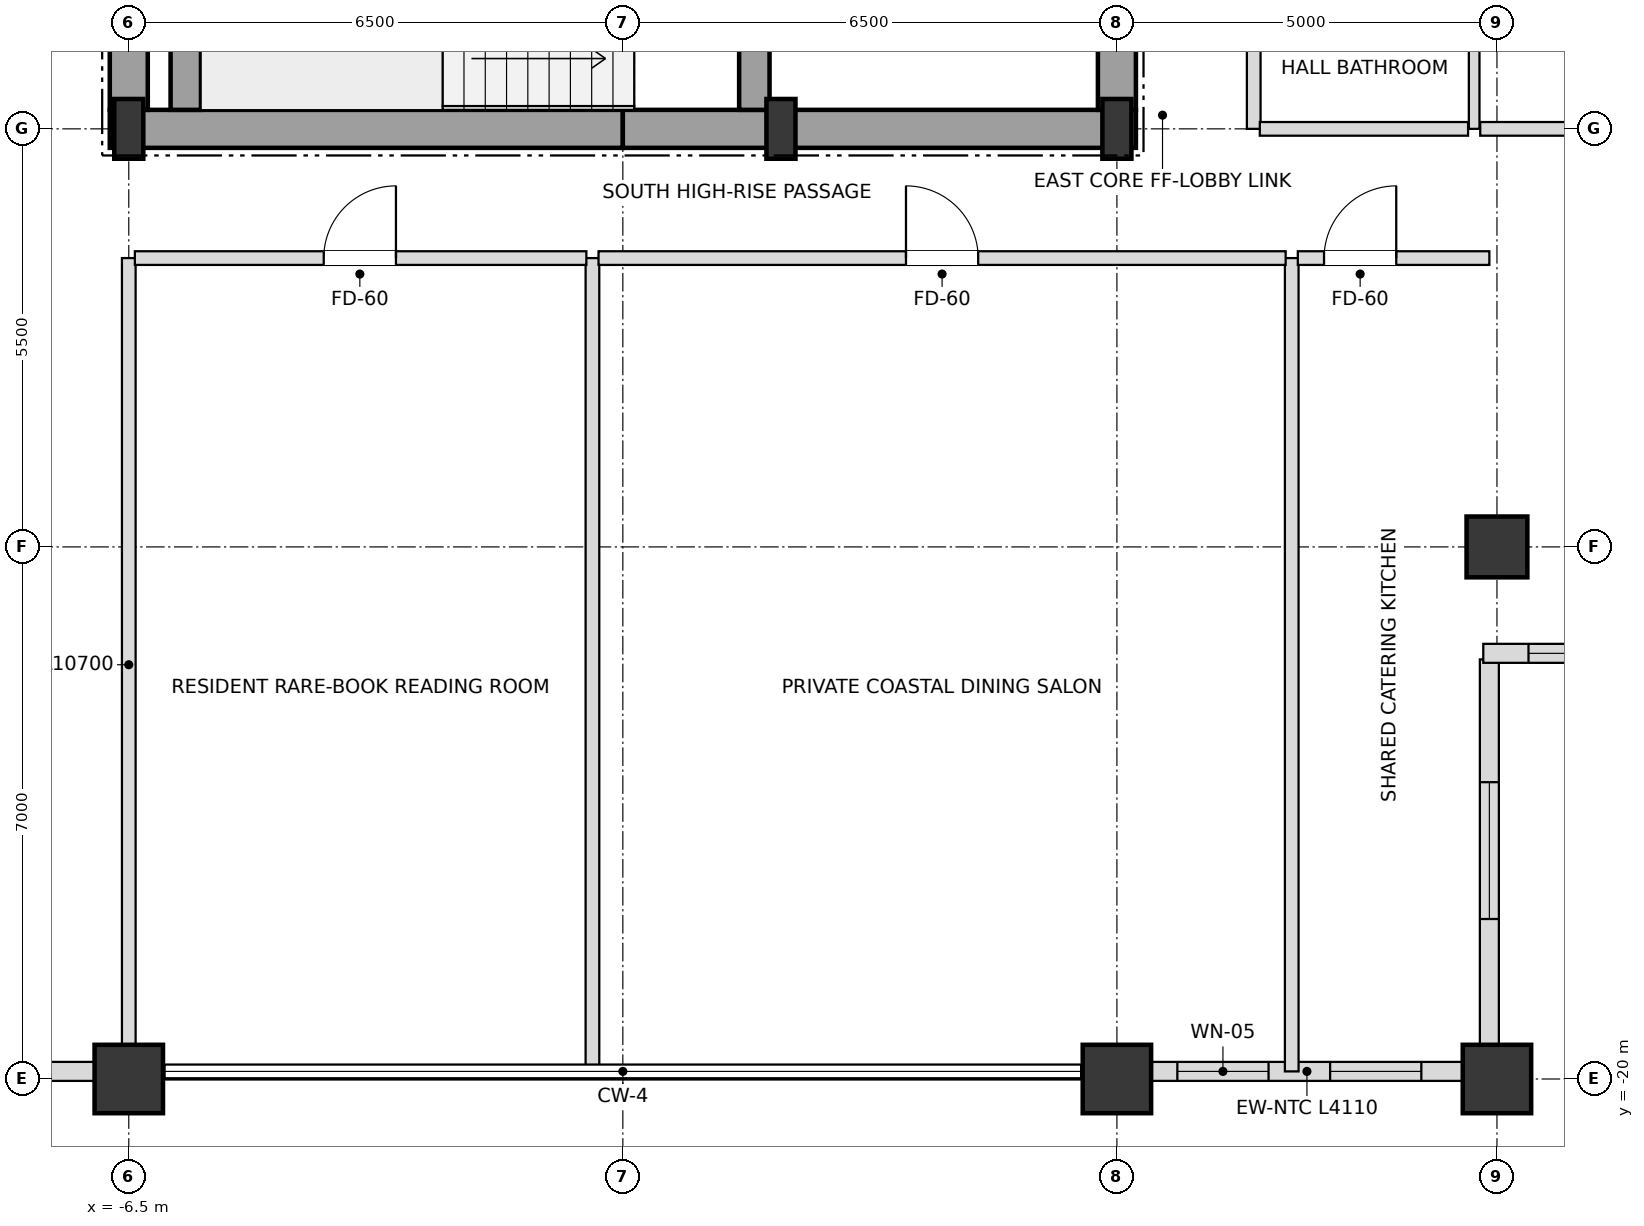
"""IFC4 building model, lengths in metres.
Left out: names, types, materials, properties, quantities, classifications, styles, units other than length and angle.
Written with IfcOpenShell. Run it as: python <this file> out.ifc"""

import sys

from ifc_helpers import new_model, si_unit, direction, frame, frame_2d, origin, origin_2d, place, context, subcontext, project, spatial, rectangle, i_section, extrude, element, fill, save


model = new_model("IFC4")
c1 = context("Model", 3, precision=1e-05, world=origin(), true_north=direction((0.0, 1.0)))
c2 = subcontext(c1, "Body", "Model", "MODEL_VIEW")
j1 = project(units=[si_unit("LENGTHUNIT", "METRE"), si_unit("PLANEANGLEUNIT", "RADIAN")], contexts=[c1])
p1 = place(None, origin())
s1 = spatial("IfcSite", under=j1, at=p1, CompositionType="ELEMENT")
p2 = place(p1, origin())
s2 = spatial("IfcBuilding", under=s1, at=p2, CompositionType="ELEMENT")
p3 = place(p2, frame((0.0, 0.0, 276.3)))
s3 = spatial("IfcBuildingStorey", under=s2, at=p3, CompositionType="ELEMENT", Elevation=276.3)
for number, where, z_axis, x_axis in (
    (1, (-6.5, -7.5, 0.0), (0.0, 0.0, 1.0), (1.0, 0.0, 0.0)),
    (2, (2.08, -7.5, 0.0), (0.0, 0.0, 1.0), (1.0, 0.0, 0.0)),
    (3, (6.5, -7.5, 0.0), (0.0, 0.0, 1.0), (1.0, 0.0, 0.0)),
):
    element("IfcColumn", number, at=place(p3, frame(where, z_axis=z_axis, x_axis=x_axis)), inside=s3, PredefinedType="COLUMN", context=c2, shape_type="SweptSolid", body=[
        extrude(i_section(OverallWidth=0.382, OverallDepth=0.786, WebThickness=0.02, FlangeThickness=0.033, at=origin_2d()), origin(), (0.0, 0.0, 1.0), 3.6),
    ])
for number, where, z_axis, x_axis in (
    (4, (-6.5, -20.0, 0.0), (0.0, 0.0, 1.0), (1.0, 0.0, 0.0)),
    (5, (6.5, -20.0, 0.0), (0.0, 0.0, 1.0), (1.0, 0.0, 0.0)),
    (6, (11.5, -20.0, 0.0), (0.0, 0.0, 1.0), (1.0, 0.0, 0.0)),
):
    element("IfcColumn", number, at=place(p3, frame(where, z_axis=z_axis, x_axis=x_axis)), inside=s3, PredefinedType="USERDEFINED", context=c2, shape_type="SweptSolid", body=[
        extrude(rectangle(XDim=0.9, YDim=0.9, at=origin_2d()), origin(), (0.0, 0.0, 1.0), 3.6),
    ])
p4 = place(p3, frame((11.5, -13.0, 0.0), z_axis=(0.0, 0.0, 1.0), x_axis=(1.0, 0.0, 0.0)))
e7 = element("IfcColumn", 7, at=p4, inside=s3, PredefinedType="COLUMN", context=c2, shape_type="SweptSolid", body=[
    extrude(rectangle(XDim=0.8, YDim=0.8, at=origin_2d()), origin(), (0.0, 0.0, 1.0), 3.6),
])
p5 = place(p3, frame((-11.055, -19.9, 0.0), z_axis=(0.0, 0.0, 1.0), x_axis=(1.0, 0.0, 0.0)))
e8 = element("IfcWall", 8, at=p5, inside=s3, PredefinedType="SOLIDWALL", context=c2, shape_type="SweptSolid", body=[
    extrude(rectangle(XDim=4.11, YDim=0.25, at=frame_2d((2.055, 0.0))), origin(), (0.0, 0.0, 1.0), 2.748),
])
p6 = place(p5, frame((1.155, 0.0, 0.72)))
e9 = element("IfcOpeningElement", 9, at=p6, cuts=e8, PredefinedType="OPENING", context=c2, shape_type="SweptSolid", body=[
    extrude(rectangle(XDim=1.8, YDim=1.68, at=frame_2d((0.9, 0.84))), frame((0.0, 0.135, 0.0), z_axis=(0.0, -1.0, 0.0), x_axis=(1.0, 0.0, 0.0)), (0.0, 0.0, 1.0), 0.27),
])
p7 = place(p3, frame((6.945, -19.9, 0.0), z_axis=(0.0, 0.0, 1.0), x_axis=(1.0, 0.0, 0.0)))
e10 = element("IfcWall", 10, at=p7, inside=s3, PredefinedType="SOLIDWALL", context=c2, shape_type="SweptSolid", body=[
    extrude(rectangle(XDim=4.11, YDim=0.25, at=frame_2d((2.055, 0.0))), origin(), (0.0, 0.0, 1.0), 2.748),
])
p8 = place(p7, frame((0.35, 0.0, 0.72)))
e11 = element("IfcOpeningElement", 11, at=p8, cuts=e10, PredefinedType="OPENING", context=c2, shape_type="SweptSolid", body=[
    extrude(rectangle(XDim=1.2, YDim=1.68, at=frame_2d((0.6, 0.84))), frame((0.0, 0.135, 0.0), z_axis=(0.0, -1.0, 0.0), x_axis=(1.0, 0.0, 0.0)), (0.0, 0.0, 1.0), 0.27),
])
p9 = place(p7, frame((2.36, 0.0, 0.72)))
e12 = element("IfcOpeningElement", 12, at=p9, cuts=e10, PredefinedType="OPENING", context=c2, shape_type="SweptSolid", body=[
    extrude(rectangle(XDim=1.2, YDim=1.68, at=frame_2d((0.6, 0.84))), frame((0.0, 0.135, 0.0), z_axis=(0.0, -1.0, 0.0), x_axis=(1.0, 0.0, 0.0)), (0.0, 0.0, 1.0), 0.27),
])
p10 = place(p3, frame((11.4, -19.82, 0.0), z_axis=(0.0, 0.0, 1.0), x_axis=(0.0, 1.0, 0.0)))
e13 = element("IfcWall", 13, at=p10, inside=s3, PredefinedType="SOLIDWALL", context=c2, shape_type="SweptSolid", body=[
    extrude(rectangle(XDim=5.34, YDim=0.25, at=frame_2d((2.67, 0.0))), origin(), (0.0, 0.0, 1.0), 2.748),
])
p11 = place(p10, frame((1.925, 0.0, 0.72)))
e14 = element("IfcOpeningElement", 14, at=p11, cuts=e13, PredefinedType="OPENING", context=c2, shape_type="SweptSolid", body=[
    extrude(rectangle(XDim=1.8, YDim=1.68, at=frame_2d((0.9, 0.84))), frame((0.0, 0.135, 0.0), z_axis=(0.0, -1.0, 0.0), x_axis=(1.0, 0.0, 0.0)), (0.0, 0.0, 1.0), 0.27),
])
p12 = place(p3, frame((11.32, -14.4, 0.0), z_axis=(0.0, 0.0, 1.0), x_axis=(1.0, 0.0, 0.0)))
e15 = element("IfcWall", 15, at=p12, inside=s3, PredefinedType="SOLIDWALL", context=c2, shape_type="SweptSolid", body=[
    extrude(rectangle(XDim=5.66, YDim=0.25, at=frame_2d((2.83, 0.0))), origin(), (0.0, 0.0, 1.0), 2.748),
])
p13 = place(p12, frame((0.595, 0.0, 0.72)))
e16 = element("IfcOpeningElement", 16, at=p13, cuts=e15, PredefinedType="OPENING", context=c2, shape_type="SweptSolid", body=[
    extrude(rectangle(XDim=1.8, YDim=1.68, at=frame_2d((0.9, 0.84))), frame((0.0, 0.135, 0.0), z_axis=(0.0, -1.0, 0.0), x_axis=(1.0, 0.0, 0.0)), (0.0, 0.0, 1.0), 0.27),
])
p14 = place(p12, frame((3.265, 0.0, 0.72)))
e17 = element("IfcOpeningElement", 17, at=p14, cuts=e15, PredefinedType="OPENING", context=c2, shape_type="SweptSolid", body=[
    extrude(rectangle(XDim=1.8, YDim=1.68, at=frame_2d((0.9, 0.84))), frame((0.0, 0.135, 0.0), z_axis=(0.0, -1.0, 0.0), x_axis=(1.0, 0.0, 0.0)), (0.0, 0.0, 1.0), 0.27),
])
for number, where, z_axis, x_axis in (
    (18, (-6.75, -7.5, 0.0), (0.0, 0.0, 1.0), (1.0, 0.0, 0.0)),
    (19, (0.0, -7.5, 0.0), (0.0, 0.0, 1.0), (1.0, 0.0, 0.0)),
):
    element("IfcWall", number, at=place(p3, frame(where, z_axis=z_axis, x_axis=x_axis)), inside=s3, PredefinedType="SHEAR", context=c2, shape_type="SweptSolid", body=[
        extrude(rectangle(XDim=6.75, YDim=0.5, at=frame_2d((3.375, 0.0))), origin(), (0.0, 0.0, 1.0), 3.38),
    ])
p15 = place(p3, frame((-6.5, -7.25, 0.0), z_axis=(0.0, 0.0, 1.0), x_axis=(0.0, 1.0, 0.0)))
e20 = element("IfcWall", 20, at=p15, inside=s3, PredefinedType="SHEAR", context=c2, shape_type="SweptSolid", body=[
    extrude(rectangle(XDim=3.55, YDim=0.5, at=frame_2d((1.775, 0.0))), origin(), (0.0, 0.0, 1.0), 3.38),
])
p16 = place(p3, frame((6.5, -7.25, 0.0), z_axis=(0.0, 0.0, 1.0), x_axis=(0.0, 1.0, 0.0)))
e21 = element("IfcWall", 21, at=p16, inside=s3, PredefinedType="SHEAR", context=c2, shape_type="SweptSolid", body=[
    extrude(rectangle(XDim=5.75, YDim=0.5, at=frame_2d((2.875, 0.0))), origin(), (0.0, 0.0, 1.0), 3.38),
])
p17 = place(p16, frame((0.85, 0.0, 0.0)))
e22 = element("IfcOpeningElement", 22, at=p17, cuts=e21, PredefinedType="OPENING", context=c2, shape_type="SweptSolid", body=[
    extrude(rectangle(XDim=1.05, YDim=2.15, at=frame_2d((0.525, 1.075))), frame((0.0, 0.26, 0.0), z_axis=(0.0, -1.0, 0.0), x_axis=(1.0, 0.0, 0.0)), (0.0, 0.0, 1.0), 0.52),
])
p18 = place(p3, frame((-5.75, -7.25, 0.0), z_axis=(0.0, 0.0, 1.0), x_axis=(0.0, 1.0, 0.0)))
e23 = element("IfcWall", 23, at=p18, inside=s3, PredefinedType="SHEAR", context=c2, shape_type="SweptSolid", body=[
    extrude(rectangle(XDim=2.9, YDim=0.4, at=frame_2d((1.45, 0.0))), origin(), (0.0, 0.0, 1.0), 3.38),
])
p19 = place(p3, frame((1.73, -7.25, 0.0), z_axis=(0.0, 0.0, 1.0), x_axis=(0.0, 1.0, 0.0)))
e24 = element("IfcWall", 24, at=p19, inside=s3, PredefinedType="SHEAR", context=c2, shape_type="SweptSolid", body=[
    extrude(rectangle(XDim=3.3, YDim=0.4, at=frame_2d((1.65, 0.0))), origin(), (0.0, 0.0, 1.0), 3.38),
])
p20 = place(p19, frame((0.9, 0.0, 0.0)))
e25 = element("IfcOpeningElement", 25, at=p20, cuts=e24, PredefinedType="OPENING", context=c2, shape_type="SweptSolid", body=[
    extrude(rectangle(XDim=1.05, YDim=2.15, at=frame_2d((0.525, 1.075))), frame((0.0, 0.21, 0.0), z_axis=(0.0, -1.0, 0.0), x_axis=(1.0, 0.0, 0.0)), (0.0, 0.0, 1.0), 0.42),
])
p21 = place(p3, frame((-6.5, -19.9, 0.0), z_axis=(0.0, 0.0, 1.0), x_axis=(0.0, 1.0, 0.0)))
e26 = element("IfcWall", 26, at=p21, inside=s3, PredefinedType="PARTITIONING", context=c2, shape_type="SweptSolid", body=[
    extrude(rectangle(XDim=10.7, YDim=0.18, at=frame_2d((5.35, 0.0))), origin(), (0.0, 0.0, 1.0), 2.826),
])
p22 = place(p3, frame((-0.4, -19.9, 0.0), z_axis=(0.0, 0.0, 1.0), x_axis=(0.0, 1.0, 0.0)))
e27 = element("IfcWall", 27, at=p22, inside=s3, PredefinedType="PARTITIONING", context=c2, shape_type="SweptSolid", body=[
    extrude(rectangle(XDim=10.7, YDim=0.18, at=frame_2d((5.35, 0.0))), origin(), (0.0, 0.0, 1.0), 3.018),
])
p23 = place(p3, frame((8.3, -7.5, 0.0), z_axis=(0.0, 0.0, 1.0), x_axis=(0.0, 1.0, 0.0)))
e28 = element("IfcWall", 28, at=p23, inside=s3, PredefinedType="PARTITIONING", context=c2, shape_type="SweptSolid", body=[
    extrude(rectangle(XDim=15.0, YDim=0.18, at=frame_2d((7.5, 0.0))), origin(), (0.0, 0.0, 1.0), 3.38),
])
p24 = place(p23, frame((2.355, 0.0, 0.0)))
e29 = element("IfcOpeningElement", 29, at=p24, cuts=e28, PredefinedType="OPENING", context=c2, shape_type="SweptSolid", body=[
    extrude(rectangle(XDim=0.95, YDim=2.15, at=frame_2d((0.475, 1.075))), frame((0.0, 0.1, 0.0), z_axis=(0.0, -1.0, 0.0), x_axis=(1.0, 0.0, 0.0)), (0.0, 0.0, 1.0), 0.2),
])
p25 = place(p3, frame((8.8, -19.9, 0.0), z_axis=(0.0, 0.0, 1.0), x_axis=(0.0, 1.0, 0.0)))
e30 = element("IfcWall", 30, at=p25, inside=s3, PredefinedType="PARTITIONING", context=c2, shape_type="SweptSolid", body=[
    extrude(rectangle(XDim=10.7, YDim=0.18, at=frame_2d((5.35, 0.0))), origin(), (0.0, 0.0, 1.0), 2.826),
])
p26 = place(p3, frame((11.2, -7.5, 0.0), z_axis=(0.0, 0.0, 1.0), x_axis=(0.0, 1.0, 0.0)))
e31 = element("IfcWall", 31, at=p26, inside=s3, PredefinedType="PARTITIONING", context=c2, shape_type="SweptSolid", body=[
    extrude(rectangle(XDim=15.0, YDim=0.14, at=frame_2d((7.5, 0.0))), origin(), (0.0, 0.0, 1.0), 3.38),
])
p27 = place(p26, frame((3.475, 0.0, 0.0)))
e32 = element("IfcOpeningElement", 32, at=p27, cuts=e31, PredefinedType="OPENING", context=c2, shape_type="SweptSolid", body=[
    extrude(rectangle(XDim=0.95, YDim=2.1, at=frame_2d((0.475, 1.05))), frame((0.0, 0.08, 0.0), z_axis=(0.0, -1.0, 0.0), x_axis=(1.0, 0.0, 0.0)), (0.0, 0.0, 1.0), 0.16),
])
p28 = place(p3, frame((-6.42, -9.2, 0.0), z_axis=(0.0, 0.0, 1.0), x_axis=(1.0, 0.0, 0.0)))
e33 = element("IfcWall", 33, at=p28, inside=s3, PredefinedType="PARTITIONING", context=c2, shape_type="SweptSolid", body=[
    extrude(rectangle(XDim=5.94, YDim=0.18, at=frame_2d((2.97, 0.0))), origin(), (0.0, 0.0, 1.0), 3.38),
])
p29 = place(p28, frame((2.485, 0.0, 0.0)))
e34 = element("IfcOpeningElement", 34, at=p29, cuts=e33, PredefinedType="OPENING", context=c2, shape_type="SweptSolid", body=[
    extrude(rectangle(XDim=0.95, YDim=2.15, at=frame_2d((0.475, 1.075))), frame((0.0, 0.1, 0.0), z_axis=(0.0, -1.0, 0.0), x_axis=(1.0, 0.0, 0.0)), (0.0, 0.0, 1.0), 0.2),
])
p30 = place(p3, frame((-0.32, -9.2, 0.0), z_axis=(0.0, 0.0, 1.0), x_axis=(1.0, 0.0, 0.0)))
e35 = element("IfcWall", 35, at=p30, inside=s3, PredefinedType="PARTITIONING", context=c2, shape_type="SweptSolid", body=[
    extrude(rectangle(XDim=9.04, YDim=0.18, at=frame_2d((4.52, 0.0))), origin(), (0.0, 0.0, 1.0), 2.826),
])
p31 = place(p30, frame((4.045, 0.0, 0.0)))
e36 = element("IfcOpeningElement", 36, at=p31, cuts=e35, PredefinedType="OPENING", context=c2, shape_type="SweptSolid", body=[
    extrude(rectangle(XDim=0.95, YDim=2.15, at=frame_2d((0.475, 1.075))), frame((0.0, 0.1, 0.0), z_axis=(0.0, -1.0, 0.0), x_axis=(1.0, 0.0, 0.0)), (0.0, 0.0, 1.0), 0.2),
])
p32 = place(p3, frame((8.88, -9.2, 0.0), z_axis=(0.0, 0.0, 1.0), x_axis=(1.0, 0.0, 0.0)))
e37 = element("IfcWall", 37, at=p32, inside=s3, PredefinedType="PARTITIONING", context=c2, shape_type="SweptSolid", body=[
    extrude(rectangle(XDim=2.52, YDim=0.18, at=frame_2d((1.26, 0.0))), origin(), (0.0, 0.0, 1.0), 3.38),
])
p33 = place(p32, frame((0.345, 0.0, 0.0)))
e38 = element("IfcOpeningElement", 38, at=p33, cuts=e37, PredefinedType="OPENING", context=c2, shape_type="SweptSolid", body=[
    extrude(rectangle(XDim=0.95, YDim=2.15, at=frame_2d((0.475, 1.075))), frame((0.0, 0.1, 0.0), z_axis=(0.0, -1.0, 0.0), x_axis=(1.0, 0.0, 0.0)), (0.0, 0.0, 1.0), 0.2),
])
p34 = place(p3, frame((8.38, -7.5, 0.0), z_axis=(0.0, 0.0, 1.0), x_axis=(1.0, 0.0, 0.0)))
e39 = element("IfcWall", 39, at=p34, inside=s3, PredefinedType="PARTITIONING", context=c2, shape_type="SweptSolid", body=[
    extrude(rectangle(XDim=2.74, YDim=0.18, at=frame_2d((1.37, 0.0))), origin(), (0.0, 0.0, 1.0), 2.826),
])
p35 = place(p3, frame((11.28, -7.5, 0.0), z_axis=(0.0, 0.0, 1.0), x_axis=(1.0, 0.0, 0.0)))
e40 = element("IfcWall", 40, at=p35, inside=s3, PredefinedType="PARTITIONING", context=c2, shape_type="SweptSolid", body=[
    extrude(rectangle(XDim=5.62, YDim=0.18, at=frame_2d((2.81, 0.0))), origin(), (0.0, 0.0, 1.0), 2.826),
])
p36 = place(p8, origin())
e41 = element("IfcWindow", 41, at=p36, inside=s3, PartitioningType="SINGLE_PANEL", PredefinedType="WINDOW", context=c2, shape_type="SweptSolid", body=[
    extrude(rectangle(XDim=1.2, YDim=1.68, at=frame_2d((0.6, 0.84))), frame((0.0, 0.03, 0.0), z_axis=(0.0, -1.0, 0.0), x_axis=(1.0, 0.0, 0.0)), (0.0, 0.0, 1.0), 0.06),
])
fill(e11, e41)
p37 = place(p9, origin())
e42 = element("IfcWindow", 42, at=p37, inside=s3, PartitioningType="SINGLE_PANEL", PredefinedType="WINDOW", context=c2, shape_type="SweptSolid", body=[
    extrude(rectangle(XDim=1.2, YDim=1.68, at=frame_2d((0.6, 0.84))), frame((0.0, 0.03, 0.0), z_axis=(0.0, -1.0, 0.0), x_axis=(1.0, 0.0, 0.0)), (0.0, 0.0, 1.0), 0.06),
])
fill(e12, e42)
p38 = place(p11, origin())
e43 = element("IfcWindow", 43, at=p38, inside=s3, PartitioningType="SINGLE_PANEL", PredefinedType="WINDOW", context=c2, shape_type="SweptSolid", body=[
    extrude(rectangle(XDim=1.8, YDim=1.68, at=frame_2d((0.9, 0.84))), frame((0.0, 0.03, 0.0), z_axis=(0.0, -1.0, 0.0), x_axis=(1.0, 0.0, 0.0)), (0.0, 0.0, 1.0), 0.06),
])
fill(e14, e43)
p39 = place(p13, origin())
e44 = element("IfcWindow", 44, at=p39, inside=s3, PartitioningType="SINGLE_PANEL", PredefinedType="WINDOW", context=c2, shape_type="SweptSolid", body=[
    extrude(rectangle(XDim=1.8, YDim=1.68, at=frame_2d((0.9, 0.84))), frame((0.0, 0.03, 0.0), z_axis=(0.0, -1.0, 0.0), x_axis=(1.0, 0.0, 0.0)), (0.0, 0.0, 1.0), 0.06),
])
fill(e16, e44)
p40 = place(p29, origin())
e45 = element("IfcDoor", 45, at=p40, inside=s3, OperationType="SINGLE_SWING_RIGHT", PredefinedType="DOOR", context=c2, shape_type="SweptSolid", body=[
    extrude(rectangle(XDim=0.95, YDim=2.15, at=frame_2d((0.475, 1.075))), frame((0.0, 0.025, 0.0), z_axis=(0.0, -1.0, 0.0), x_axis=(1.0, 0.0, 0.0)), (0.0, 0.0, 1.0), 0.05),
])
fill(e34, e45)
p41 = place(p31, origin())
e46 = element("IfcDoor", 46, at=p41, inside=s3, OperationType="SINGLE_SWING_LEFT", PredefinedType="DOOR", context=c2, shape_type="SweptSolid", body=[
    extrude(rectangle(XDim=0.95, YDim=2.15, at=frame_2d((0.475, 1.075))), frame((0.0, 0.025, 0.0), z_axis=(0.0, -1.0, 0.0), x_axis=(1.0, 0.0, 0.0)), (0.0, 0.0, 1.0), 0.05),
])
fill(e36, e46)
p42 = place(p33, origin())
e47 = element("IfcDoor", 47, at=p42, inside=s3, OperationType="SINGLE_SWING_RIGHT", PredefinedType="DOOR", context=c2, shape_type="SweptSolid", body=[
    extrude(rectangle(XDim=0.95, YDim=2.15, at=frame_2d((0.475, 1.075))), frame((0.0, 0.025, 0.0), z_axis=(0.0, -1.0, 0.0), x_axis=(1.0, 0.0, 0.0)), (0.0, 0.0, 1.0), 0.05),
])
fill(e38, e47)
save(model, sys.argv[1])
